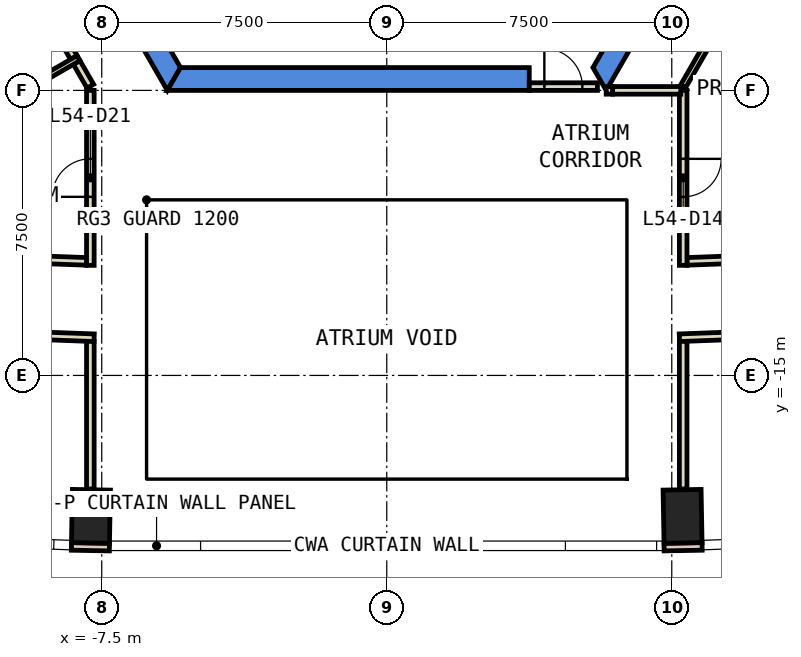
"""IFC4 building model, lengths in metres.
Left out: names, types, materials, properties, quantities, classifications, styles, units other than length and angle.
Written with IfcOpenShell. Run it as: python <this file> out.ifc"""

import sys

from ifc_helpers import new_model, si_unit, direction, frame, frame_2d, origin, origin_2d, place, context, subcontext, project, spatial, polyline, rectangle, outline, extrude, element, fill, save


model = new_model("IFC4")
c1 = context("Model", 3, precision=1e-05, world=origin(), true_north=direction((0.0, 1.0)))
c2 = subcontext(c1, "Body", "Model", "MODEL_VIEW")
j1 = project(units=[si_unit("LENGTHUNIT", "METRE"), si_unit("PLANEANGLEUNIT", "RADIAN")], contexts=[c1])
p1 = place(None, origin())
s1 = spatial("IfcSite", under=j1, at=p1, CompositionType="ELEMENT")
p2 = place(p1, origin())
s2 = spatial("IfcBuilding", under=s1, at=p2, CompositionType="ELEMENT")
p3 = place(p2, frame((0.0, 0.0, 241.4)))
s3 = spatial("IfcBuildingStorey", under=s2, at=p3, CompositionType="ELEMENT", Elevation=241.4)
for number, where, z_axis, x_axis in (
    (1, (-7.784, -18.708, 0.0), (0.0, 0.0, 1.0), (-1.0, 0.018, 0.0)),
    (2, (7.784, -18.708, 0.0), (0.0, 0.0, 1.0), (1.0, 0.018, 0.0)),
):
    element("IfcColumn", number, at=place(p3, frame(where, z_axis=z_axis, x_axis=x_axis)), inside=s3, PredefinedType="COLUMN", context=c2, shape_type="SweptSolid", body=[
        extrude(rectangle(XDim=1.0, YDim=1.4, at=origin_2d()), origin(), (0.0, 0.0, 1.0), 3.26),
    ])
p4 = place(p3, frame((0.0, 0.0, -0.6)))
e3 = element("IfcWall", 3, at=p4, inside=s3, PredefinedType="SHEAR", context=c2, shape_type="SweptSolid", body=[
    extrude(outline(polyline([(-11.547, 2.5), (-5.774, -7.5), (-5.427, -6.9), (-10.854, 2.5), (-11.547, 2.5)])), origin(), (0.0, 0.0, 1.0), 3.86),
])
p5 = place(p3, frame((0.0, 0.0, -0.6)))
e4 = element("IfcWall", 4, at=p5, inside=s3, PredefinedType="SHEAR", context=c2, shape_type="SweptSolid", body=[
    extrude(outline(polyline([(3.75, -7.5), (3.75, -6.9), (-5.427, -6.9), (-5.774, -7.5), (3.75, -7.5)])), origin(), (0.0, 0.0, 1.0), 3.86),
])
p6 = place(p3, frame((0.0, 0.0, -0.6)))
e5 = element("IfcWall", 5, at=p6, inside=s3, PredefinedType="SHEAR", context=c2, shape_type="SweptSolid", body=[
    extrude(outline(polyline([(5.774, -7.5), (11.547, 2.5), (10.854, 2.5), (5.427, -6.9), (5.774, -7.5)])), origin(), (0.0, 0.0, 1.0), 3.86),
])
for number, where, z_axis, x_axis in (
    (6, (7.578, -4.375, -0.6), (0.0, 0.0, 1.0), (0.866, -0.5, 0.0)),
    (7, (-7.578, -4.375, -0.6), (0.0, 0.0, 1.0), (-0.866, -0.5, 0.0)),
):
    element("IfcWall", number, at=place(p3, frame(where, z_axis=z_axis, x_axis=x_axis)), inside=s3, PredefinedType="SHEAR", context=c2, shape_type="SweptSolid", body=[
        extrude(rectangle(XDim=9.0, YDim=0.8, at=frame_2d((4.5, 0.0))), origin(), (0.0, 0.0, 1.0), 3.86),
    ])
for number, where, z_axis, x_axis in (
    (8, (-8.298, -19.499, 0.0), (0.0, 0.0, 1.0), (1.0, -0.018, 0.0)),
    (9, (7.298, -19.517, 0.0), (0.0, 0.0, 1.0), (1.0, 0.018, 0.0)),
):
    element("IfcWall", number, at=place(p3, frame(where, z_axis=z_axis, x_axis=x_axis)), inside=s3, PredefinedType="STANDARD", context=c2, shape_type="SweptSolid", body=[
        extrude(rectangle(XDim=1.0, YDim=0.2, at=frame_2d((0.5, 0.0))), origin(), (0.0, 0.0, 1.0), 3.26),
    ])
p7 = place(p3, frame((7.9, -11.999, 0.0), z_axis=(0.0, 0.0, 1.0), x_axis=(0.999343711998, 0.036223546064, 0.0)))
e10 = element("IfcWall", 10, at=p7, inside=s3, PredefinedType="PARTITIONING", context=c2, shape_type="SweptSolid", body=[
    extrude(rectangle(XDim=2.979, YDim=0.2, at=frame_2d((1.49, 0.0))), origin(), (0.0, 0.0, 1.0), 3.26),
])
p8 = place(p3, frame((-8.235, -6.636, 0.0), z_axis=(0.0, 0.0, 1.0), x_axis=(-0.500089055364, 0.86597398154, 0.0)))
e11 = element("IfcWall", 11, at=p8, inside=s3, PredefinedType="PARTITIONING", context=c2, shape_type="SweptSolid", body=[
    extrude(rectangle(XDim=1.23, YDim=0.2, at=frame_2d((0.615, 0.0))), origin(), (0.0, 0.0, 1.0), 3.26),
])
p9 = place(p3, frame((-7.8, -7.39, 0.0), z_axis=(0.0, 0.0, 1.0), x_axis=(-0.499712670472, 0.866191230024, 0.0)))
e12 = element("IfcWall", 12, at=p9, inside=s3, PredefinedType="PARTITIONING", context=c2, shape_type="SweptSolid", body=[
    extrude(rectangle(XDim=0.72, YDim=0.2, at=frame_2d((0.36, 0.0))), origin(), (0.0, 0.0, 1.0), 3.26),
])
p10 = place(p3, frame((-11.052, -11.884, 0.0), z_axis=(0.0, 0.0, 1.0), x_axis=(0.999335249241, -0.036456270033, 0.0)))
e13 = element("IfcWall", 13, at=p10, inside=s3, PredefinedType="PARTITIONING", context=c2, shape_type="SweptSolid", body=[
    extrude(rectangle(XDim=3.154, YDim=0.2, at=frame_2d((1.577, 0.0))), origin(), (0.0, 0.0, 1.0), 3.26),
])
p11 = place(p3, frame((15.636, -13.718, 0.0), z_axis=(0.0, 0.0, 1.0), x_axis=(-0.99933282306, -0.036522715615, 0.0)))
e14 = element("IfcWall", 14, at=p11, inside=s3, PredefinedType="PARTITIONING", context=c2, shape_type="SweptSolid", body=[
    extrude(rectangle(XDim=7.941, YDim=0.2, at=frame_2d((3.971, 0.0))), origin(), (0.0, 0.0, 1.0), 3.26),
])
p12 = place(p11, frame((3.471, 0.0, 0.0)))
e15 = element("IfcOpeningElement", 15, at=p12, cuts=e14, PredefinedType="OPENING", context=c2, shape_type="SweptSolid", body=[
    extrude(rectangle(XDim=1.0, YDim=2.1, at=frame_2d((0.5, 1.05))), frame((0.0, 0.11, 0.0), z_axis=(0.0, -1.0, 0.0), x_axis=(1.0, 0.0, 0.0)), (0.0, 0.0, 1.0), 0.22),
])
p13 = place(p3, frame((-7.7, -14.008, 0.0), z_axis=(0.0, 0.0, 1.0), x_axis=(-0.99933282306, 0.036522715615, 0.0)))
e16 = element("IfcWall", 16, at=p13, inside=s3, PredefinedType="PARTITIONING", context=c2, shape_type="SweptSolid", body=[
    extrude(rectangle(XDim=7.941, YDim=0.2, at=frame_2d((3.971, 0.0))), origin(), (0.0, 0.0, 1.0), 3.26),
])
p14 = place(p13, frame((3.471, 0.0, 0.0)))
e17 = element("IfcOpeningElement", 17, at=p14, cuts=e16, PredefinedType="OPENING", context=c2, shape_type="SweptSolid", body=[
    extrude(rectangle(XDim=1.0, YDim=2.1, at=frame_2d((0.5, 1.05))), frame((0.0, 0.11, 0.0), z_axis=(0.0, -1.0, 0.0), x_axis=(1.0, 0.0, 0.0)), (0.0, 0.0, 1.0), 0.22),
])
p15 = place(p3, frame((5.775, -7.499, 0.0), z_axis=(0.0, 0.0, 1.0), x_axis=(1.0, 0.0, 0.0)))
e18 = element("IfcWall", 18, at=p15, inside=s3, PredefinedType="PARTITIONING", context=c2, shape_type="SweptSolid", body=[
    extrude(rectangle(XDim=0.169, YDim=0.2, at=frame_2d((0.084, 0.0))), origin(), (0.0, 0.0, 1.0), 2.4),
])
p16 = place(p3, frame((7.8, -7.39, 0.0), z_axis=(0.0, 0.0, 1.0), x_axis=(0.499977374825, 0.866038466041, 0.0)))
e19 = element("IfcWall", 19, at=p16, inside=s3, PredefinedType="PARTITIONING", context=c2, shape_type="SweptSolid", body=[
    extrude(rectangle(XDim=2.1, YDim=0.15, at=frame_2d((1.05, 0.0))), origin(), (0.0, 0.0, 1.0), 3.26),
])
p17 = place(p3, frame((7.8, -7.499, 0.0), z_axis=(0.0, 0.0, 1.0), x_axis=(0.0, -1.0, 0.0)))
e20 = element("IfcWall", 20, at=p17, inside=s3, PredefinedType="PARTITIONING", context=c2, shape_type="SweptSolid", body=[
    extrude(rectangle(XDim=4.604, YDim=0.2, at=frame_2d((2.302, 0.0))), origin(), (0.0, 0.0, 1.0), 3.26),
])
p18 = place(p17, frame((1.802, 0.0, 0.0)))
e21 = element("IfcOpeningElement", 21, at=p18, cuts=e20, PredefinedType="OPENING", context=c2, shape_type="SweptSolid", body=[
    extrude(rectangle(XDim=1.0, YDim=2.1, at=frame_2d((0.5, 1.05))), frame((0.0, 0.11, 0.0), z_axis=(0.0, -1.0, 0.0), x_axis=(1.0, 0.0, 0.0)), (0.0, 0.0, 1.0), 0.22),
])
p19 = place(p3, frame((-7.8, -12.103, 0.0), z_axis=(0.0, 0.0, 1.0), x_axis=(0.0, 1.0, 0.0)))
e22 = element("IfcWall", 22, at=p19, inside=s3, PredefinedType="PARTITIONING", context=c2, shape_type="SweptSolid", body=[
    extrude(rectangle(XDim=4.604, YDim=0.2, at=frame_2d((2.302, 0.0))), origin(), (0.0, 0.0, 1.0), 3.26),
])
p20 = place(p19, frame((1.802, 0.0, 0.0)))
e23 = element("IfcOpeningElement", 23, at=p20, cuts=e22, PredefinedType="OPENING", context=c2, shape_type="SweptSolid", body=[
    extrude(rectangle(XDim=1.0, YDim=2.1, at=frame_2d((0.5, 1.05))), frame((0.0, 0.11, 0.0), z_axis=(0.0, -1.0, 0.0), x_axis=(1.0, 0.0, 0.0)), (0.0, 0.0, 1.0), 0.22),
])
for number, where, z_axis, x_axis in (
    (24, (7.8, -14.104, 0.0), (0.0, 0.0, 1.0), (0.0, -1.0, 0.0)),
    (25, (-7.8, -17.988, 0.0), (0.0, 0.0, 1.0), (0.0, 1.0, 0.0)),
):
    element("IfcWall", number, at=place(p3, frame(where, z_axis=z_axis, x_axis=x_axis)), inside=s3, PredefinedType="PARTITIONING", context=c2, shape_type="SweptSolid", body=[
        extrude(rectangle(XDim=3.884, YDim=0.2, at=frame_2d((1.942, 0.0))), origin(), (0.0, 0.0, 1.0), 3.26),
    ])
p21 = place(p3, frame((-8.111, -6.651, 0.0), z_axis=(0.0, 0.0, 1.0), x_axis=(-0.865984471925, -0.50007088936, 0.0)))
e26 = element("IfcWall", 26, at=p21, inside=s3, PredefinedType="PARTITIONING", context=c2, shape_type="SweptSolid", body=[
    extrude(rectangle(XDim=5.176, YDim=0.15, at=frame_2d((2.588, 0.0))), origin(), (0.0, 0.0, 1.0), 3.26),
])
p22 = place(p3, frame((3.75, -7.4, 0.0), z_axis=(0.0, 0.0, 1.0), x_axis=(1.0, 0.0, 0.0)))
e27 = element("IfcWall", 27, at=p22, inside=s3, PredefinedType="PARTITIONING", context=c2, shape_type="SweptSolid", body=[
    extrude(rectangle(XDim=1.794, YDim=0.2, at=frame_2d((0.897, 0.0))), origin(), (0.0, 0.0, 1.0), 2.4),
])
p23 = place(p22, frame((0.397, 0.0, 0.0)))
e28 = element("IfcOpeningElement", 28, at=p23, cuts=e27, PredefinedType="OPENING", context=c2, shape_type="SweptSolid", body=[
    extrude(rectangle(XDim=1.0, YDim=2.1, at=frame_2d((0.5, 1.05))), frame((0.0, 0.11, 0.0), z_axis=(0.0, -1.0, 0.0), x_axis=(1.0, 0.0, 0.0)), (0.0, 0.0, 1.0), 0.22),
])
p24 = place(p3, frame((5.944, -7.499, 0.0), z_axis=(0.0, 0.0, 1.0), x_axis=(1.0, 0.0, 0.0)))
e29 = element("IfcWall", 29, at=p24, inside=s3, PredefinedType="PARTITIONING", context=c2, shape_type="SweptSolid", body=[
    extrude(rectangle(XDim=1.793, YDim=0.2, at=frame_2d((0.896, 0.0))), origin(), (0.0, 0.0, 1.0), 3.26),
])
p25 = place(p18, origin())
e30 = element("IfcDoor", 30, at=p25, inside=s3, OperationType="SINGLE_SWING_LEFT", PredefinedType="DOOR", context=c2, shape_type="SweptSolid", body=[
    extrude(rectangle(XDim=1.0, YDim=2.1, at=frame_2d((0.5, 1.05))), frame((0.0, 0.025, 0.0), z_axis=(0.0, -1.0, 0.0), x_axis=(1.0, 0.0, 0.0)), (0.0, 0.0, 1.0), 0.05),
])
fill(e21, e30)
p26 = place(p20, origin())
e31 = element("IfcDoor", 31, at=p26, inside=s3, OperationType="SINGLE_SWING_LEFT", PredefinedType="DOOR", context=c2, shape_type="SweptSolid", body=[
    extrude(rectangle(XDim=1.0, YDim=2.1, at=frame_2d((0.5, 1.05))), frame((0.0, 0.025, 0.0), z_axis=(0.0, -1.0, 0.0), x_axis=(1.0, 0.0, 0.0)), (0.0, 0.0, 1.0), 0.05),
])
fill(e23, e31)
p27 = place(p23, origin())
e32 = element("IfcDoor", 32, at=p27, inside=s3, OperationType="SINGLE_SWING_LEFT", PredefinedType="DOOR", context=c2, shape_type="SweptSolid", body=[
    extrude(rectangle(XDim=1.0, YDim=2.1, at=frame_2d((0.5, 1.05))), frame((0.0, 0.025, 0.0), z_axis=(0.0, -1.0, 0.0), x_axis=(1.0, 0.0, 0.0)), (0.0, 0.0, 1.0), 0.05),
])
fill(e28, e32)
save(model, sys.argv[1])
